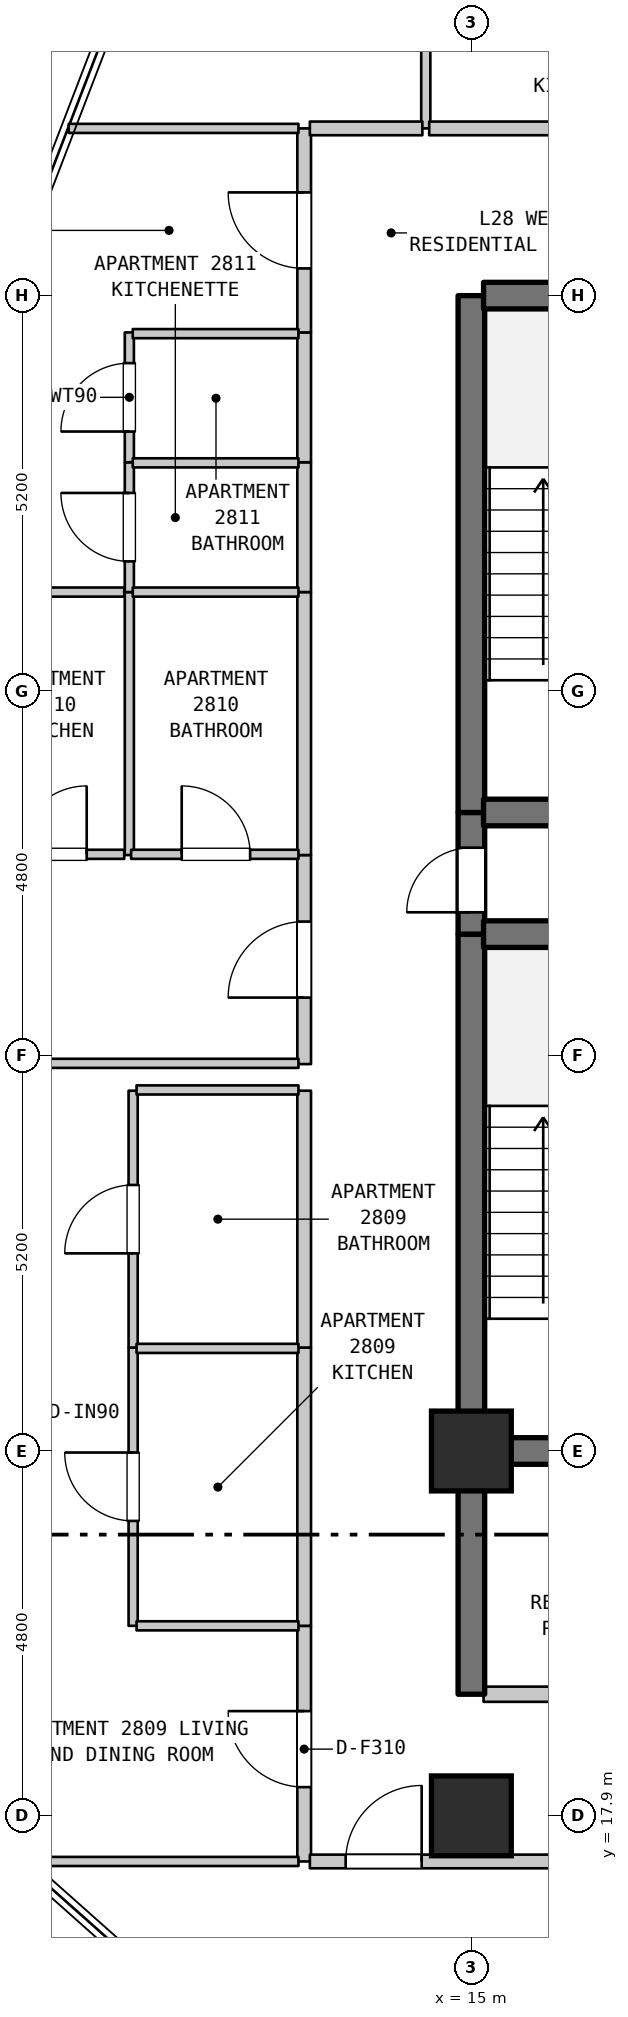
"""IFC4 building model, lengths in metres.
Left out: names, types, materials, properties, quantities, classifications, styles, units other than length and angle.
Written with IfcOpenShell. Run it as: python <this file> out.ifc"""

import sys

from ifc_helpers import new_model, si_unit, direction, frame, frame_2d, origin, origin_2d, place, context, subcontext, project, spatial, rectangle, extrude, element, fill, save


model = new_model("IFC4")
c1 = context("Model", 3, precision=1e-05, world=origin(), true_north=direction((0.0, 1.0)))
c2 = subcontext(c1, "Body", "Model", "MODEL_VIEW")
j1 = project(units=[si_unit("LENGTHUNIT", "METRE"), si_unit("PLANEANGLEUNIT", "RADIAN")], contexts=[c1])
p1 = place(None, origin())
s1 = spatial("IfcSite", under=j1, at=p1, CompositionType="ELEMENT")
p2 = place(p1, origin())
s2 = spatial("IfcBuilding", under=s1, at=p2, CompositionType="ELEMENT")
p3 = place(p2, frame((0.0, 0.0, 116.8)))
s3 = spatial("IfcBuildingStorey", under=s2, at=p3, CompositionType="ELEMENT", Elevation=116.8)
for number, where, z_axis, x_axis in (
    (1, (15.0, 17.9, 0.0), (0.0, 0.0, 1.0), (1.0, 0.0, 0.0)),
    (2, (15.0, 22.7, 0.0), (0.0, 0.0, 1.0), (1.0, 0.0, 0.0)),
):
    element("IfcColumn", number, at=place(p3, frame(where, z_axis=z_axis, x_axis=x_axis)), inside=s3, PredefinedType="COLUMN", context=c2, shape_type="SweptSolid", body=[
        extrude(rectangle(XDim=1.05, YDim=1.05, at=origin_2d()), origin(), (0.0, 0.0, 1.0), 3.7),
    ])
p4 = place(p3, frame((10.5, 30.54, 0.0), z_axis=(0.0, 0.0, 1.0), x_axis=(0.0, 1.0, 0.0)))
e3 = element("IfcWall", 3, at=p4, inside=s3, PredefinedType="PARTITIONING", context=c2, shape_type="SweptSolid", body=[
    extrude(rectangle(XDim=3.46, YDim=0.12, at=frame_2d((1.73, 0.0))), origin(), (0.0, 0.0, 1.0), 3.38),
])
p5 = place(p3, frame((10.5, 34.0, 0.0), z_axis=(0.0, 0.0, 1.0), x_axis=(0.0, 1.0, 0.0)))
e4 = element("IfcWall", 4, at=p5, inside=s3, PredefinedType="PARTITIONING", context=c2, shape_type="SweptSolid", body=[
    extrude(rectangle(XDim=1.708, YDim=0.12, at=frame_2d((0.854, 0.0))), origin(), (0.0, 0.0, 1.0), 3.38),
])
p6 = place(p5, frame((0.404, 0.0, 0.0)))
e5 = element("IfcOpeningElement", 5, at=p6, cuts=e4, PredefinedType="OPENING", context=c2, shape_type="SweptSolid", body=[
    extrude(rectangle(XDim=0.9, YDim=2.15, at=frame_2d((0.45, 1.075))), frame((0.0, 0.07, 0.0), z_axis=(0.0, -1.0, 0.0), x_axis=(1.0, 0.0, 0.0)), (0.0, 0.0, 1.0), 0.14),
])
p7 = place(p3, frame((10.5, 35.708, 0.0), z_axis=(0.0, 0.0, 1.0), x_axis=(0.0, 1.0, 0.0)))
e6 = element("IfcWall", 6, at=p7, inside=s3, PredefinedType="PARTITIONING", context=c2, shape_type="SweptSolid", body=[
    extrude(rectangle(XDim=1.708, YDim=0.12, at=frame_2d((0.854, 0.0))), origin(), (0.0, 0.0, 1.0), 3.38),
])
p8 = place(p7, frame((0.404, 0.0, 0.0)))
e7 = element("IfcOpeningElement", 7, at=p8, cuts=e6, PredefinedType="OPENING", context=c2, shape_type="SweptSolid", body=[
    extrude(rectangle(XDim=0.9, YDim=2.1, at=frame_2d((0.45, 1.05))), frame((0.0, 0.07, 0.0), z_axis=(0.0, -1.0, 0.0), x_axis=(1.0, 0.0, 0.0)), (0.0, 0.0, 1.0), 0.14),
])
p9 = place(p3, frame((10.55, 20.4, 0.0), z_axis=(0.0, 0.0, 1.0), x_axis=(0.0, 1.0, 0.0)))
e8 = element("IfcWall", 8, at=p9, inside=s3, PredefinedType="PARTITIONING", context=c2, shape_type="SweptSolid", body=[
    extrude(rectangle(XDim=3.661, YDim=0.12, at=frame_2d((1.831, 0.0))), origin(), (0.0, 0.0, 1.0), 3.38),
])
p10 = place(p9, frame((1.38, 0.0, 0.0)))
e9 = element("IfcOpeningElement", 9, at=p10, cuts=e8, PredefinedType="OPENING", context=c2, shape_type="SweptSolid", body=[
    extrude(rectangle(XDim=0.9, YDim=2.15, at=frame_2d((0.45, 1.075))), frame((0.0, 0.07, 0.0), z_axis=(0.0, -1.0, 0.0), x_axis=(1.0, 0.0, 0.0)), (0.0, 0.0, 1.0), 0.14),
])
p11 = place(p3, frame((10.55, 24.061, 0.0), z_axis=(0.0, 0.0, 1.0), x_axis=(0.0, 1.0, 0.0)))
e10 = element("IfcWall", 10, at=p11, inside=s3, PredefinedType="PARTITIONING", context=c2, shape_type="SweptSolid", body=[
    extrude(rectangle(XDim=3.379, YDim=0.12, at=frame_2d((1.689, 0.0))), origin(), (0.0, 0.0, 1.0), 3.38),
])
p12 = place(p11, frame((1.239, 0.0, 0.0)))
e11 = element("IfcOpeningElement", 11, at=p12, cuts=e10, PredefinedType="OPENING", context=c2, shape_type="SweptSolid", body=[
    extrude(rectangle(XDim=0.9, YDim=2.1, at=frame_2d((0.45, 1.05))), frame((0.0, 0.07, 0.0), z_axis=(0.0, -1.0, 0.0), x_axis=(1.0, 0.0, 0.0)), (0.0, 0.0, 1.0), 0.14),
])
p13 = place(p3, frame((12.8, 17.3, 0.0), z_axis=(0.0, 0.0, 1.0), x_axis=(0.0, 1.0, 0.0)))
e12 = element("IfcWall", 12, at=p13, inside=s3, PredefinedType="STANDARD", context=c2, shape_type="SweptSolid", body=[
    extrude(rectangle(XDim=3.1, YDim=0.18, at=frame_2d((1.55, 0.0))), origin(), (0.0, 0.0, 1.0), 3.38),
])
p14 = place(p13, frame((0.978, 0.0, 0.0)))
e13 = element("IfcOpeningElement", 13, at=p14, cuts=e12, PredefinedType="OPENING", context=c2, shape_type="SweptSolid", body=[
    extrude(rectangle(XDim=1.0, YDim=2.15, at=frame_2d((0.5, 1.075))), frame((0.0, 0.1, 0.0), z_axis=(0.0, -1.0, 0.0), x_axis=(1.0, 0.0, 0.0)), (0.0, 0.0, 1.0), 0.2),
])
p15 = place(p3, frame((12.8, 20.4, 0.0), z_axis=(0.0, 0.0, 1.0), x_axis=(0.0, 1.0, 0.0)))
e14 = element("IfcWall", 14, at=p15, inside=s3, PredefinedType="STANDARD", context=c2, shape_type="SweptSolid", body=[
    extrude(rectangle(XDim=3.661, YDim=0.18, at=frame_2d((1.831, 0.0))), origin(), (0.0, 0.0, 1.0), 3.38),
])
p16 = place(p3, frame((12.8, 24.061, 0.0), z_axis=(0.0, 0.0, 1.0), x_axis=(0.0, 1.0, 0.0)))
e15 = element("IfcWall", 15, at=p16, inside=s3, PredefinedType="STANDARD", context=c2, shape_type="SweptSolid", body=[
    extrude(rectangle(XDim=3.379, YDim=0.18, at=frame_2d((1.689, 0.0))), origin(), (0.0, 0.0, 1.0), 3.38),
])
p17 = place(p3, frame((12.8, 27.79, 0.0), z_axis=(0.0, 0.0, 1.0), x_axis=(0.0, 1.0, 0.0)))
e16 = element("IfcWall", 16, at=p17, inside=s3, PredefinedType="STANDARD", context=c2, shape_type="SweptSolid", body=[
    extrude(rectangle(XDim=2.75, YDim=0.18, at=frame_2d((1.375, 0.0))), origin(), (0.0, 0.0, 1.0), 3.38),
])
p18 = place(p17, frame((0.875, 0.0, 0.0)))
e17 = element("IfcOpeningElement", 17, at=p18, cuts=e16, PredefinedType="OPENING", context=c2, shape_type="SweptSolid", body=[
    extrude(rectangle(XDim=1.0, YDim=2.15, at=frame_2d((0.5, 1.075))), frame((0.0, 0.1, 0.0), z_axis=(0.0, -1.0, 0.0), x_axis=(1.0, 0.0, 0.0)), (0.0, 0.0, 1.0), 0.2),
])
p19 = place(p3, frame((12.8, 30.54, 0.0), z_axis=(0.0, 0.0, 1.0), x_axis=(0.0, 1.0, 0.0)))
e18 = element("IfcWall", 18, at=p19, inside=s3, PredefinedType="STANDARD", context=c2, shape_type="SweptSolid", body=[
    extrude(rectangle(XDim=3.46, YDim=0.18, at=frame_2d((1.73, 0.0))), origin(), (0.0, 0.0, 1.0), 3.38),
])
for number, where, z_axis, x_axis in (
    (19, (12.8, 34.0, 0.0), (0.0, 0.0, 1.0), (0.0, 1.0, 0.0)),
    (20, (12.8, 35.708, 0.0), (0.0, 0.0, 1.0), (0.0, 1.0, 0.0)),
):
    element("IfcWall", number, at=place(p3, frame(where, z_axis=z_axis, x_axis=x_axis)), inside=s3, PredefinedType="STANDARD", context=c2, shape_type="SweptSolid", body=[
        extrude(rectangle(XDim=1.708, YDim=0.18, at=frame_2d((0.854, 0.0))), origin(), (0.0, 0.0, 1.0), 3.38),
    ])
p20 = place(p3, frame((12.8, 37.416, 0.0), z_axis=(0.0, 0.0, 1.0), x_axis=(0.0, 1.0, 0.0)))
e21 = element("IfcWall", 21, at=p20, inside=s3, PredefinedType="STANDARD", context=c2, shape_type="SweptSolid", body=[
    extrude(rectangle(XDim=2.684, YDim=0.18, at=frame_2d((1.342, 0.0))), origin(), (0.0, 0.0, 1.0), 3.38),
])
p21 = place(p20, frame((0.842, 0.0, 0.0)))
e22 = element("IfcOpeningElement", 22, at=p21, cuts=e21, PredefinedType="OPENING", context=c2, shape_type="SweptSolid", body=[
    extrude(rectangle(XDim=1.0, YDim=2.15, at=frame_2d((0.5, 1.075))), frame((0.0, 0.1, 0.0), z_axis=(0.0, -1.0, 0.0), x_axis=(1.0, 0.0, 0.0)), (0.0, 0.0, 1.0), 0.2),
])
p22 = place(p3, frame((14.4, 40.1, 0.0), z_axis=(0.0, 0.0, 1.0), x_axis=(0.0, 1.0, 0.0)))
e23 = element("IfcWall", 23, at=p22, inside=s3, PredefinedType="PARTITIONING", context=c2, shape_type="SweptSolid", body=[
    extrude(rectangle(XDim=2.3, YDim=0.12, at=frame_2d((1.15, 0.0))), origin(), (0.0, 0.0, 1.0), 3.38),
])
p23 = place(p3, frame((15.0, 19.5, 0.0), z_axis=(0.0, 0.0, 1.0), x_axis=(0.0, 1.0, 0.0)))
e24 = element("IfcWall", 24, at=p23, inside=s3, PredefinedType="SHEAR", context=c2, shape_type="SweptSolid", body=[
    extrude(rectangle(XDim=3.2, YDim=0.35, at=frame_2d((1.6, 0.0))), origin(), (0.0, 0.0, 1.0), 3.38),
])
p24 = place(p3, frame((15.0, 22.7, 0.0), z_axis=(0.0, 0.0, 1.0), x_axis=(0.0, 1.0, 0.0)))
e25 = element("IfcWall", 25, at=p24, inside=s3, PredefinedType="SHEAR", context=c2, shape_type="SweptSolid", body=[
    extrude(rectangle(XDim=6.8, YDim=0.35, at=frame_2d((3.4, 0.0))), origin(), (0.0, 0.0, 1.0), 3.38),
])
p25 = place(p3, frame((15.0, 29.5, 0.0), z_axis=(0.0, 0.0, 1.0), x_axis=(0.0, 1.0, 0.0)))
e26 = element("IfcWall", 26, at=p25, inside=s3, PredefinedType="SHEAR", context=c2, shape_type="SweptSolid", body=[
    extrude(rectangle(XDim=1.6, YDim=0.35, at=frame_2d((0.8, 0.0))), origin(), (0.0, 0.0, 1.0), 3.38),
])
p26 = place(p25, frame((0.287, 0.0, 0.0)))
e27 = element("IfcOpeningElement", 27, at=p26, cuts=e26, PredefinedType="OPENING", context=c2, shape_type="SweptSolid", body=[
    extrude(rectangle(XDim=0.85, YDim=2.1, at=frame_2d((0.425, 1.05))), frame((0.0, 0.185, 0.0), z_axis=(0.0, -1.0, 0.0), x_axis=(1.0, 0.0, 0.0)), (0.0, 0.0, 1.0), 0.37),
])
p27 = place(p3, frame((15.0, 31.1, 0.0), z_axis=(0.0, 0.0, 1.0), x_axis=(0.0, 1.0, 0.0)))
e28 = element("IfcWall", 28, at=p27, inside=s3, PredefinedType="SHEAR", context=c2, shape_type="SweptSolid", body=[
    extrude(rectangle(XDim=6.8, YDim=0.35, at=frame_2d((3.4, 0.0))), origin(), (0.0, 0.0, 1.0), 3.38),
])
p28 = place(p3, frame((9.085, 17.3, 0.0), z_axis=(0.0, 0.0, 1.0), x_axis=(1.0, 0.0, 0.0)))
e29 = element("IfcWall", 29, at=p28, inside=s3, PredefinedType="PARTITIONING", context=c2, shape_type="SweptSolid", body=[
    extrude(rectangle(XDim=3.64, YDim=0.12, at=frame_2d((1.82, 0.0))), origin(), (0.0, 0.0, 1.0), 3.38),
])
p29 = place(p3, frame((12.875, 17.3, 0.0), z_axis=(0.0, 0.0, 1.0), x_axis=(1.0, 0.0, 0.0)))
e30 = element("IfcWall", 30, at=p29, inside=s3, PredefinedType="STANDARD", context=c2, shape_type="SweptSolid", body=[
    extrude(rectangle(XDim=3.28, YDim=0.18, at=frame_2d((1.64, 0.0))), origin(), (0.0, 0.0, 1.0), 3.38),
])
p30 = place(p29, frame((0.471, 0.0, 0.0)))
e31 = element("IfcOpeningElement", 31, at=p30, cuts=e30, PredefinedType="OPENING", context=c2, shape_type="SweptSolid", body=[
    extrude(rectangle(XDim=1.0, YDim=2.15, at=frame_2d((0.5, 1.075))), frame((0.0, 0.1, 0.0), z_axis=(0.0, -1.0, 0.0), x_axis=(1.0, 0.0, 0.0)), (0.0, 0.0, 1.0), 0.2),
])
p31 = place(p3, frame((15.16, 19.5, 0.0), z_axis=(0.0, 0.0, 1.0), x_axis=(1.0, 0.0, 0.0)))
e32 = element("IfcWall", 32, at=p31, inside=s3, PredefinedType="STANDARD", context=c2, shape_type="SweptSolid", body=[
    extrude(rectangle(XDim=3.68, YDim=0.2, at=frame_2d((1.84, 0.0))), origin(), (0.0, 0.0, 1.0), 3.38),
])
p32 = place(p31, frame((1.39, 0.0, 0.0)))
e33 = element("IfcOpeningElement", 33, at=p32, cuts=e32, PredefinedType="OPENING", context=c2, shape_type="SweptSolid", body=[
    extrude(rectangle(XDim=0.9, YDim=2.15, at=frame_2d((0.45, 1.075))), frame((0.0, 0.11, 0.0), z_axis=(0.0, -1.0, 0.0), x_axis=(1.0, 0.0, 0.0)), (0.0, 0.0, 1.0), 0.22),
])
p33 = place(p3, frame((10.595, 20.4, 0.0), z_axis=(0.0, 0.0, 1.0), x_axis=(1.0, 0.0, 0.0)))
e34 = element("IfcWall", 34, at=p33, inside=s3, PredefinedType="PARTITIONING", context=c2, shape_type="SweptSolid", body=[
    extrude(rectangle(XDim=2.13, YDim=0.12, at=frame_2d((1.065, 0.0))), origin(), (0.0, 0.0, 1.0), 3.38),
])
p34 = place(p3, frame((15.16, 22.7, 0.0), z_axis=(0.0, 0.0, 1.0), x_axis=(1.0, 0.0, 0.0)))
e35 = element("IfcWall", 35, at=p34, inside=s3, PredefinedType="SHEAR", context=c2, shape_type="SweptSolid", body=[
    extrude(rectangle(XDim=3.68, YDim=0.35, at=frame_2d((1.84, 0.0))), origin(), (0.0, 0.0, 1.0), 3.38),
])
for number, where, z_axis, x_axis in (
    (36, (10.595, 24.05, 0.0), (0.0, 0.0, 1.0), (1.0, 0.0, 0.0)),
    (37, (10.595, 27.45, 0.0), (0.0, 0.0, 1.0), (1.0, 0.0, 0.0)),
):
    element("IfcWall", number, at=place(p3, frame(where, z_axis=z_axis, x_axis=x_axis)), inside=s3, PredefinedType="PARTITIONING", context=c2, shape_type="SweptSolid", body=[
        extrude(rectangle(XDim=2.13, YDim=0.12, at=frame_2d((1.065, 0.0))), origin(), (0.0, 0.0, 1.0), 3.38),
    ])
p35 = place(p3, frame((9.03, 27.8, 0.0), z_axis=(0.0, 0.0, 1.0), x_axis=(1.0, 0.0, 0.0)))
e38 = element("IfcWall", 38, at=p35, inside=s3, PredefinedType="PARTITIONING", context=c2, shape_type="SweptSolid", body=[
    extrude(rectangle(XDim=3.695, YDim=0.12, at=frame_2d((1.848, 0.0))), origin(), (0.0, 0.0, 1.0), 3.38),
])
p36 = place(p3, frame((15.16, 29.5, 0.0), z_axis=(0.0, 0.0, 1.0), x_axis=(1.0, 0.0, 0.0)))
e39 = element("IfcWall", 39, at=p36, inside=s3, PredefinedType="SHEAR", context=c2, shape_type="SweptSolid", body=[
    extrude(rectangle(XDim=3.68, YDim=0.35, at=frame_2d((1.84, 0.0))), origin(), (0.0, 0.0, 1.0), 3.38),
])
p37 = place(p3, frame((8.545, 30.55, 0.0), z_axis=(0.0, 0.0, 1.0), x_axis=(1.0, 0.0, 0.0)))
e40 = element("IfcWall", 40, at=p37, inside=s3, PredefinedType="PARTITIONING", context=c2, shape_type="SweptSolid", body=[
    extrude(rectangle(XDim=1.888, YDim=0.12, at=frame_2d((0.944, 0.0))), origin(), (0.0, 0.0, 1.0), 3.38),
])
p38 = place(p37, frame((0.494, 0.0, 0.0)))
e41 = element("IfcOpeningElement", 41, at=p38, cuts=e40, PredefinedType="OPENING", context=c2, shape_type="SweptSolid", body=[
    extrude(rectangle(XDim=0.9, YDim=2.15, at=frame_2d((0.45, 1.075))), frame((0.0, 0.07, 0.0), z_axis=(0.0, -1.0, 0.0), x_axis=(1.0, 0.0, 0.0)), (0.0, 0.0, 1.0), 0.14),
])
p39 = place(p3, frame((10.523, 30.55, 0.0), z_axis=(0.0, 0.0, 1.0), x_axis=(1.0, 0.0, 0.0)))
e42 = element("IfcWall", 42, at=p39, inside=s3, PredefinedType="PARTITIONING", context=c2, shape_type="SweptSolid", body=[
    extrude(rectangle(XDim=2.202, YDim=0.12, at=frame_2d((1.101, 0.0))), origin(), (0.0, 0.0, 1.0), 3.38),
])
p40 = place(p39, frame((0.666, 0.0, 0.0)))
e43 = element("IfcOpeningElement", 43, at=p40, cuts=e42, PredefinedType="OPENING", context=c2, shape_type="SweptSolid", body=[
    extrude(rectangle(XDim=0.9, YDim=2.1, at=frame_2d((0.45, 1.05))), frame((0.0, 0.07, 0.0), z_axis=(0.0, -1.0, 0.0), x_axis=(1.0, 0.0, 0.0)), (0.0, 0.0, 1.0), 0.14),
])
p41 = place(p3, frame((15.16, 31.1, 0.0), z_axis=(0.0, 0.0, 1.0), x_axis=(1.0, 0.0, 0.0)))
e44 = element("IfcWall", 44, at=p41, inside=s3, PredefinedType="SHEAR", context=c2, shape_type="SweptSolid", body=[
    extrude(rectangle(XDim=3.68, YDim=0.35, at=frame_2d((1.84, 0.0))), origin(), (0.0, 0.0, 1.0), 3.38),
])
p42 = place(p3, frame((8.545, 34.0, 0.0), z_axis=(0.0, 0.0, 1.0), x_axis=(1.0, 0.0, 0.0)))
e45 = element("IfcWall", 45, at=p42, inside=s3, PredefinedType="PARTITIONING", context=c2, shape_type="SweptSolid", body=[
    extrude(rectangle(XDim=1.888, YDim=0.12, at=frame_2d((0.944, 0.0))), origin(), (0.0, 0.0, 1.0), 3.38),
])
for number, where, z_axis, x_axis in (
    (46, (10.545, 34.0, 0.0), (0.0, 0.0, 1.0), (1.0, 0.0, 0.0)),
    (47, (10.545, 35.7, 0.0), (0.0, 0.0, 1.0), (1.0, 0.0, 0.0)),
    (48, (10.545, 37.4, 0.0), (0.0, 0.0, 1.0), (1.0, 0.0, 0.0)),
):
    element("IfcWall", number, at=place(p3, frame(where, z_axis=z_axis, x_axis=x_axis)), inside=s3, PredefinedType="PARTITIONING", context=c2, shape_type="SweptSolid", body=[
        extrude(rectangle(XDim=2.18, YDim=0.12, at=frame_2d((1.09, 0.0))), origin(), (0.0, 0.0, 1.0), 3.38),
    ])
p43 = place(p3, frame((15.16, 37.9, 0.0), z_axis=(0.0, 0.0, 1.0), x_axis=(1.0, 0.0, 0.0)))
e49 = element("IfcWall", 49, at=p43, inside=s3, PredefinedType="SHEAR", context=c2, shape_type="SweptSolid", body=[
    extrude(rectangle(XDim=3.68, YDim=0.35, at=frame_2d((1.84, 0.0))), origin(), (0.0, 0.0, 1.0), 3.38),
])
p44 = place(p3, frame((9.702, 40.1, 0.0), z_axis=(0.0, 0.0, 1.0), x_axis=(1.0, 0.0, 0.0)))
e50 = element("IfcWall", 50, at=p44, inside=s3, PredefinedType="PARTITIONING", context=c2, shape_type="SweptSolid", body=[
    extrude(rectangle(XDim=3.023, YDim=0.12, at=frame_2d((1.512, 0.0))), origin(), (0.0, 0.0, 1.0), 3.38),
])
p45 = place(p3, frame((12.875, 40.1, 0.0), z_axis=(0.0, 0.0, 1.0), x_axis=(1.0, 0.0, 0.0)))
e51 = element("IfcWall", 51, at=p45, inside=s3, PredefinedType="STANDARD", context=c2, shape_type="SweptSolid", body=[
    extrude(rectangle(XDim=1.48, YDim=0.18, at=frame_2d((0.74, 0.0))), origin(), (0.0, 0.0, 1.0), 3.38),
])
p46 = place(p3, frame((14.445, 40.1, 0.0), z_axis=(0.0, 0.0, 1.0), x_axis=(1.0, 0.0, 0.0)))
e52 = element("IfcWall", 52, at=p46, inside=s3, PredefinedType="STANDARD", context=c2, shape_type="SweptSolid", body=[
    extrude(rectangle(XDim=2.96, YDim=0.18, at=frame_2d((1.48, 0.0))), origin(), (0.0, 0.0, 1.0), 3.38),
])
p47 = place(p6, origin())
e53 = element("IfcDoor", 53, at=p47, inside=s3, OperationType="SINGLE_SWING_RIGHT", PredefinedType="DOOR", context=c2, shape_type="SweptSolid", body=[
    extrude(rectangle(XDim=0.9, YDim=2.15, at=frame_2d((0.45, 1.075))), frame((0.0, 0.025, 0.0), z_axis=(0.0, -1.0, 0.0), x_axis=(1.0, 0.0, 0.0)), (0.0, 0.0, 1.0), 0.05),
])
fill(e5, e53)
p48 = place(p8, origin())
e54 = element("IfcDoor", 54, at=p48, inside=s3, OperationType="SINGLE_SWING_LEFT", PredefinedType="DOOR", context=c2, shape_type="SweptSolid", body=[
    extrude(rectangle(XDim=0.9, YDim=2.1, at=frame_2d((0.45, 1.05))), frame((0.0, 0.025, 0.0), z_axis=(0.0, -1.0, 0.0), x_axis=(1.0, 0.0, 0.0)), (0.0, 0.0, 1.0), 0.05),
])
fill(e7, e54)
p49 = place(p10, origin())
e55 = element("IfcDoor", 55, at=p49, inside=s3, OperationType="SINGLE_SWING_RIGHT", PredefinedType="DOOR", context=c2, shape_type="SweptSolid", body=[
    extrude(rectangle(XDim=0.9, YDim=2.15, at=frame_2d((0.45, 1.075))), frame((0.0, 0.025, 0.0), z_axis=(0.0, -1.0, 0.0), x_axis=(1.0, 0.0, 0.0)), (0.0, 0.0, 1.0), 0.05),
])
fill(e9, e55)
p50 = place(p12, origin())
e56 = element("IfcDoor", 56, at=p50, inside=s3, OperationType="SINGLE_SWING_LEFT", PredefinedType="DOOR", context=c2, shape_type="SweptSolid", body=[
    extrude(rectangle(XDim=0.9, YDim=2.1, at=frame_2d((0.45, 1.05))), frame((0.0, 0.025, 0.0), z_axis=(0.0, -1.0, 0.0), x_axis=(1.0, 0.0, 0.0)), (0.0, 0.0, 1.0), 0.05),
])
fill(e11, e56)
p51 = place(p14, origin())
e57 = element("IfcDoor", 57, at=p51, inside=s3, OperationType="SINGLE_SWING_RIGHT", PredefinedType="DOOR", context=c2, shape_type="SweptSolid", body=[
    extrude(rectangle(XDim=1.0, YDim=2.15, at=frame_2d((0.5, 1.075))), frame((0.0, 0.025, 0.0), z_axis=(0.0, -1.0, 0.0), x_axis=(1.0, 0.0, 0.0)), (0.0, 0.0, 1.0), 0.05),
])
fill(e13, e57)
p52 = place(p18, origin())
e58 = element("IfcDoor", 58, at=p52, inside=s3, OperationType="SINGLE_SWING_LEFT", PredefinedType="DOOR", context=c2, shape_type="SweptSolid", body=[
    extrude(rectangle(XDim=1.0, YDim=2.15, at=frame_2d((0.5, 1.075))), frame((0.0, 0.025, 0.0), z_axis=(0.0, -1.0, 0.0), x_axis=(1.0, 0.0, 0.0)), (0.0, 0.0, 1.0), 0.05),
])
fill(e17, e58)
p53 = place(p21, origin())
e59 = element("IfcDoor", 59, at=p53, inside=s3, OperationType="SINGLE_SWING_RIGHT", PredefinedType="DOOR", context=c2, shape_type="SweptSolid", body=[
    extrude(rectangle(XDim=1.0, YDim=2.15, at=frame_2d((0.5, 1.075))), frame((0.0, 0.025, 0.0), z_axis=(0.0, -1.0, 0.0), x_axis=(1.0, 0.0, 0.0)), (0.0, 0.0, 1.0), 0.05),
])
fill(e22, e59)
p54 = place(p26, origin())
e60 = element("IfcDoor", 60, at=p54, inside=s3, OperationType="SINGLE_SWING_LEFT", PredefinedType="DOOR", context=c2, shape_type="SweptSolid", body=[
    extrude(rectangle(XDim=0.85, YDim=2.1, at=frame_2d((0.425, 1.05))), frame((0.0, 0.025, 0.0), z_axis=(0.0, -1.0, 0.0), x_axis=(1.0, 0.0, 0.0)), (0.0, 0.0, 1.0), 0.05),
])
fill(e27, e60)
p55 = place(p30, origin())
e61 = element("IfcDoor", 61, at=p55, inside=s3, OperationType="SINGLE_SWING_RIGHT", PredefinedType="DOOR", context=c2, shape_type="SweptSolid", body=[
    extrude(rectangle(XDim=1.0, YDim=2.15, at=frame_2d((0.5, 1.075))), frame((0.0, 0.025, 0.0), z_axis=(0.0, -1.0, 0.0), x_axis=(1.0, 0.0, 0.0)), (0.0, 0.0, 1.0), 0.05),
])
fill(e31, e61)
p56 = place(p38, origin())
e62 = element("IfcDoor", 62, at=p56, inside=s3, OperationType="SINGLE_SWING_RIGHT", PredefinedType="DOOR", context=c2, shape_type="SweptSolid", body=[
    extrude(rectangle(XDim=0.9, YDim=2.15, at=frame_2d((0.45, 1.075))), frame((0.0, 0.025, 0.0), z_axis=(0.0, -1.0, 0.0), x_axis=(1.0, 0.0, 0.0)), (0.0, 0.0, 1.0), 0.05),
])
fill(e41, e62)
p57 = place(p40, origin())
e63 = element("IfcDoor", 63, at=p57, inside=s3, OperationType="SINGLE_SWING_LEFT", PredefinedType="DOOR", context=c2, shape_type="SweptSolid", body=[
    extrude(rectangle(XDim=0.9, YDim=2.1, at=frame_2d((0.45, 1.05))), frame((0.0, 0.025, 0.0), z_axis=(0.0, -1.0, 0.0), x_axis=(1.0, 0.0, 0.0)), (0.0, 0.0, 1.0), 0.05),
])
fill(e43, e63)
save(model, sys.argv[1])
